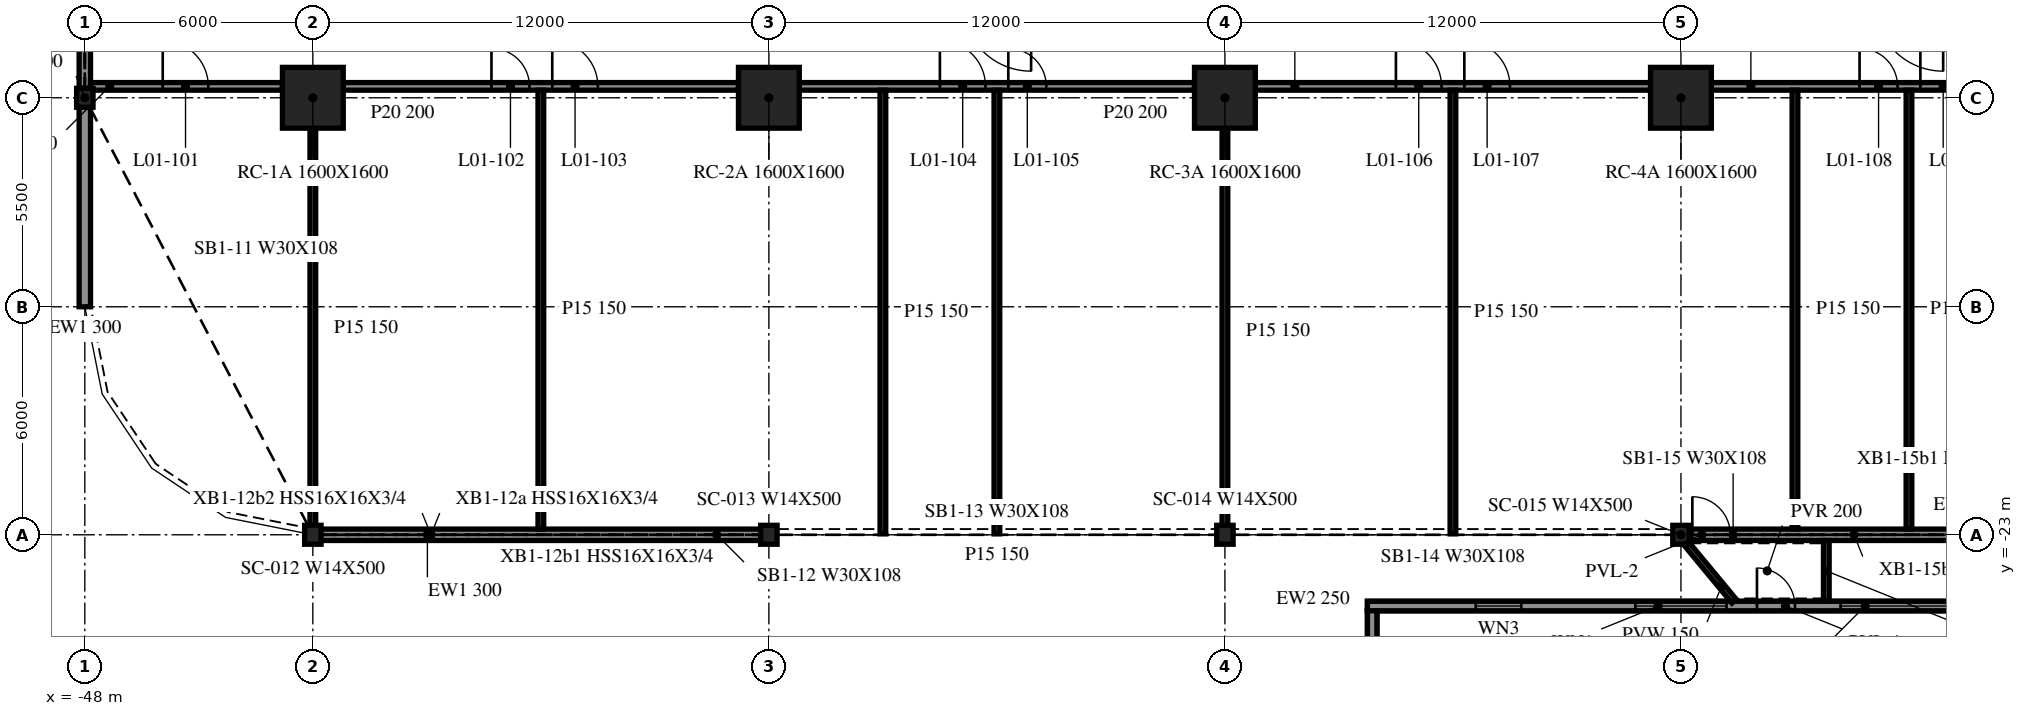
"""IFC4 building model, lengths in metres.
Left out: names, types, materials, properties, quantities, classifications, styles, units other than length and angle.
Written with IfcOpenShell. Run it as: python <this file> out.ifc"""

import sys

from ifc_helpers import new_model, si_unit, direction, frame, frame_2d, origin, origin_2d, place, context, subcontext, project, spatial, rectangle, i_section, extrude, element, fill, save


model = new_model("IFC4")
c1 = context("Model", 3, precision=1e-05, world=origin(), true_north=direction((0.0, 1.0)))
c2 = subcontext(c1, "Body", "Model", "MODEL_VIEW")
j1 = project(units=[si_unit("LENGTHUNIT", "METRE"), si_unit("PLANEANGLEUNIT", "RADIAN")], contexts=[c1])
p1 = place(None, origin())
s1 = spatial("IfcSite", under=j1, at=p1, CompositionType="ELEMENT")
p2 = place(p1, origin())
s2 = spatial("IfcBuilding", under=s1, at=p2, CompositionType="ELEMENT")
p3 = place(p2, frame((0.0, 0.0, 7.2)))
s3 = spatial("IfcBuildingStorey", under=s2, at=p3, CompositionType="ELEMENT", Elevation=7.2)
for number, where, z_axis, x_axis in (
    (1, (-42.0, -11.5, -0.34), (0.0, 0.0, 1.0), (1.0, 0.0, 0.0)),
    (2, (-30.0, -11.5, -0.34), (0.0, 0.0, 1.0), (1.0, 0.0, 0.0)),
    (3, (-18.0, -11.5, -0.34), (0.0, 0.0, 1.0), (1.0, 0.0, 0.0)),
    (4, (-6.0, -11.5, -0.34), (0.0, 0.0, 1.0), (1.0, 0.0, 0.0)),
):
    element("IfcColumn", number, at=place(p3, frame(where, z_axis=z_axis, x_axis=x_axis)), inside=s3, PredefinedType="COLUMN", context=c2, shape_type="SweptSolid", body=[
        extrude(rectangle(XDim=1.6, YDim=1.6, at=origin_2d()), origin(), (0.0, 0.0, 1.0), 4.3),
    ])
for number, where, z_axis, x_axis in (
    (5, (-48.0, -11.5, -0.34), (0.0, 0.0, 1.0), (1.0, 0.0, 0.0)),
    (6, (-42.0, -23.0, -0.34), (0.0, 0.0, 1.0), (1.0, 0.0, 0.0)),
    (7, (-30.0, -23.0, -0.34), (0.0, 0.0, 1.0), (1.0, 0.0, 0.0)),
    (8, (-18.0, -23.0, -0.34), (0.0, 0.0, 1.0), (1.0, 0.0, 0.0)),
    (9, (-6.0, -23.0, -0.34), (0.0, 0.0, 1.0), (1.0, 0.0, 0.0)),
):
    element("IfcColumn", number, at=place(p3, frame(where, z_axis=z_axis, x_axis=x_axis)), inside=s3, PredefinedType="COLUMN", context=c2, shape_type="SweptSolid", body=[
        extrude(i_section(OverallWidth=0.432, OverallDepth=0.498, WebThickness=0.056, FlangeThickness=0.089, at=origin_2d()), origin(), (0.0, 0.0, 1.0), 4.3),
    ])
p4 = place(p3, frame((-48.0, -0.249, 0.0), z_axis=(0.0, 0.0, 1.0), x_axis=(0.0, -1.0, 0.0)))
e10 = element("IfcWall", 10, at=p4, inside=s3, PredefinedType="NOTDEFINED", context=c2, shape_type="SweptSolid", body=[
    extrude(rectangle(XDim=11.002, YDim=0.3, at=frame_2d((5.501, 0.0))), origin(), (0.0, 0.0, 1.0), 3.203),
])
p5 = place(p3, frame((-48.0, -11.749, 0.0), z_axis=(0.0, 0.0, 1.0), x_axis=(0.0, -1.0, 0.0)))
e11 = element("IfcWall", 11, at=p5, inside=s3, PredefinedType="NOTDEFINED", context=c2, shape_type="SweptSolid", body=[
    extrude(rectangle(XDim=5.251, YDim=0.3, at=frame_2d((2.625, 0.0))), origin(), (0.0, 0.0, 1.0), 3.203),
])
p6 = place(p3, frame((-41.972, -23.0, 0.0), z_axis=(0.0, 0.0, 1.0), x_axis=(1.0, 0.0, 0.0)))
e12 = element("IfcWall", 12, at=p6, inside=s3, PredefinedType="NOTDEFINED", context=c2, shape_type="SweptSolid", body=[
    extrude(rectangle(XDim=11.944, YDim=0.3, at=frame_2d((5.972, 0.0))), origin(), (0.0, 0.0, 1.0), 3.203),
])
p7 = place(p3, frame((-5.972, -23.0, 0.0), z_axis=(0.0, 0.0, 1.0), x_axis=(1.0, 0.0, 0.0)))
e13 = element("IfcWall", 13, at=p7, inside=s3, PredefinedType="NOTDEFINED", context=c2, shape_type="SweptSolid", body=[
    extrude(rectangle(XDim=11.944, YDim=0.3, at=frame_2d((5.972, 0.0))), origin(), (0.0, 0.0, 1.0), 3.203),
])
p8 = place(p7, frame((0.272, 0.0, 0.0)))
e14 = element("IfcOpeningElement", 14, at=p8, cuts=e13, PredefinedType="OPENING", context=c2, shape_type="SweptSolid", body=[
    extrude(rectangle(XDim=1.0, YDim=2.1, at=frame_2d((0.5, 1.05))), frame((0.0, 0.16, 0.0), z_axis=(0.0, -1.0, 0.0), x_axis=(1.0, 0.0, 0.0)), (0.0, 0.0, 1.0), 0.32),
])
p9 = place(p3, frame((-14.25, -24.875, 0.0), z_axis=(0.0, 0.0, 1.0), x_axis=(1.0, 0.0, 0.0)))
e15 = element("IfcWall", 15, at=p9, inside=s3, PredefinedType="SOLIDWALL", context=c2, shape_type="SweptSolid", body=[
    extrude(rectangle(XDim=28.5, YDim=0.25, at=frame_2d((14.25, 0.0))), origin(), (0.0, 0.0, 1.0), 4.0),
])
p10 = place(p9, frame((2.85, 0.0, 0.9)))
e16 = element("IfcOpeningElement", 16, at=p10, cuts=e15, PredefinedType="OPENING", context=c2, shape_type="SweptSolid", body=[
    extrude(rectangle(XDim=1.2, YDim=2.0, at=frame_2d((0.6, 1.0))), frame((0.0, 0.135, 0.0), z_axis=(0.0, -1.0, 0.0), x_axis=(1.0, 0.0, 0.0)), (0.0, 0.0, 1.0), 0.27),
])
p11 = place(p9, frame((7.05, 0.0, 0.9)))
e17 = element("IfcOpeningElement", 17, at=p11, cuts=e15, PredefinedType="OPENING", context=c2, shape_type="SweptSolid", body=[
    extrude(rectangle(XDim=2.4, YDim=2.0, at=frame_2d((1.2, 1.0))), frame((0.0, 0.135, 0.0), z_axis=(0.0, -1.0, 0.0), x_axis=(1.0, 0.0, 0.0)), (0.0, 0.0, 1.0), 0.27),
])
p12 = place(p9, frame((12.45, 0.0, 0.9)))
e18 = element("IfcOpeningElement", 18, at=p12, cuts=e15, PredefinedType="OPENING", context=c2, shape_type="SweptSolid", body=[
    extrude(rectangle(XDim=3.6, YDim=2.0, at=frame_2d((1.8, 1.0))), frame((0.0, 0.135, 0.0), z_axis=(0.0, -1.0, 0.0), x_axis=(1.0, 0.0, 0.0)), (0.0, 0.0, 1.0), 0.27),
])
p13 = place(p9, frame((19.05, 0.0, 0.9)))
e19 = element("IfcOpeningElement", 19, at=p13, cuts=e15, PredefinedType="OPENING", context=c2, shape_type="SweptSolid", body=[
    extrude(rectangle(XDim=2.4, YDim=2.0, at=frame_2d((1.2, 1.0))), frame((0.0, 0.135, 0.0), z_axis=(0.0, -1.0, 0.0), x_axis=(1.0, 0.0, 0.0)), (0.0, 0.0, 1.0), 0.27),
])
p14 = place(p9, frame((24.45, 0.0, 0.9)))
e20 = element("IfcOpeningElement", 20, at=p14, cuts=e15, PredefinedType="OPENING", context=c2, shape_type="SweptSolid", body=[
    extrude(rectangle(XDim=1.2, YDim=2.0, at=frame_2d((0.6, 1.0))), frame((0.0, 0.135, 0.0), z_axis=(0.0, -1.0, 0.0), x_axis=(1.0, 0.0, 0.0)), (0.0, 0.0, 1.0), 0.27),
])
p15 = place(p9, frame((10.25, 0.0, 0.0)))
e21 = element("IfcOpeningElement", 21, at=p15, cuts=e15, PredefinedType="OPENING", context=c2, shape_type="SweptSolid", body=[
    extrude(rectangle(XDim=1.0, YDim=2.1, at=frame_2d((0.5, 1.05))), frame((0.0, 0.135, 0.0), z_axis=(0.0, -1.0, 0.0), x_axis=(1.0, 0.0, 0.0)), (0.0, 0.0, 1.0), 0.27),
])
p16 = place(p3, frame((-14.125, -33.25, 0.0), z_axis=(0.0, 0.0, 1.0), x_axis=(0.0, 1.0, 0.0)))
e22 = element("IfcWall", 22, at=p16, inside=s3, PredefinedType="SOLIDWALL", context=c2, shape_type="SweptSolid", body=[
    extrude(rectangle(XDim=8.25, YDim=0.25, at=frame_2d((4.125, 0.0))), origin(), (0.0, 0.0, 1.0), 4.0),
])
p17 = place(p16, frame((2.925, 0.0, 0.0)))
e23 = element("IfcOpeningElement", 23, at=p17, cuts=e22, PredefinedType="OPENING", context=c2, shape_type="SweptSolid", body=[
    extrude(rectangle(XDim=2.4, YDim=2.7, at=frame_2d((1.2, 1.35))), frame((0.0, 0.135, 0.0), z_axis=(0.0, -1.0, 0.0), x_axis=(1.0, 0.0, 0.0)), (0.0, 0.0, 1.0), 0.27),
])
p18 = place(p3, frame((-14.25, -24.875, 4.3), z_axis=(0.0, 0.0, 1.0), x_axis=(1.0, 0.0, 0.0)))
e24 = element("IfcWall", 24, at=p18, inside=s3, PredefinedType="PARAPET", context=c2, shape_type="SweptSolid", body=[
    extrude(rectangle(XDim=28.5, YDim=0.25, at=frame_2d((14.25, 0.0))), origin(), (0.0, 0.0, 1.0), 0.6),
])
p19 = place(p3, frame((-14.125, -33.0, 4.3), z_axis=(0.0, 0.0, 1.0), x_axis=(0.0, 1.0, 0.0)))
e25 = element("IfcWall", 25, at=p19, inside=s3, PredefinedType="PARAPET", context=c2, shape_type="SweptSolid", body=[
    extrude(rectangle(XDim=8.0, YDim=0.25, at=frame_2d((4.0, 0.0))), origin(), (0.0, 0.0, 1.0), 0.6),
])
p20 = place(p3, frame((-4.6, -24.75, 0.0), z_axis=(0.0, 0.0, 1.0), x_axis=(-0.637776936143, 0.770221123914, 0.0)))
e26 = element("IfcWall", 26, at=p20, inside=s3, PredefinedType="SOLIDWALL", context=c2, shape_type="SweptSolid", body=[
    extrude(rectangle(XDim=2.077, YDim=0.15, at=frame_2d((1.039, 0.0))), origin(), (0.0, 0.0, 1.0), 3.8),
])
p21 = place(p3, frame((-2.175, -24.75, 0.0), z_axis=(0.0, 0.0, 1.0), x_axis=(0.0, 1.0, 0.0)))
e27 = element("IfcWall", 27, at=p21, inside=s3, PredefinedType="SOLIDWALL", context=c2, shape_type="SweptSolid", body=[
    extrude(rectangle(XDim=1.6, YDim=0.15, at=frame_2d((0.8, 0.0))), origin(), (0.0, 0.0, 1.0), 3.8),
])
p22 = place(p3, frame((-47.85, -11.2, 0.0), z_axis=(0.0, 0.0, 1.0), x_axis=(1.0, 0.0, 0.0)))
e28 = element("IfcWall", 28, at=p22, inside=s3, PredefinedType="PARTITIONING", context=c2, shape_type="SweptSolid", body=[
    extrude(rectangle(XDim=5.05, YDim=0.2, at=frame_2d((2.525, 0.0))), origin(), (0.0, 0.0, 1.0), 3.96),
])
p23 = place(p22, frame((1.9, 0.0, 0.0)))
e29 = element("IfcOpeningElement", 29, at=p23, cuts=e28, PredefinedType="OPENING", context=c2, shape_type="SweptSolid", body=[
    extrude(rectangle(XDim=1.2, YDim=2.1, at=frame_2d((0.6, 1.05))), frame((0.0, 0.11, 0.0), z_axis=(0.0, -1.0, 0.0), x_axis=(1.0, 0.0, 0.0)), (0.0, 0.0, 1.0), 0.22),
])
p24 = place(p3, frame((-41.2, -11.2, 0.0), z_axis=(0.0, 0.0, 1.0), x_axis=(1.0, 0.0, 0.0)))
e30 = element("IfcWall", 30, at=p24, inside=s3, PredefinedType="PARTITIONING", context=c2, shape_type="SweptSolid", body=[
    extrude(rectangle(XDim=10.4, YDim=0.2, at=frame_2d((5.2, 0.0))), origin(), (0.0, 0.0, 1.0), 3.96),
])
p25 = place(p24, frame((3.9, 0.0, 0.0)))
e31 = element("IfcOpeningElement", 31, at=p25, cuts=e30, PredefinedType="OPENING", context=c2, shape_type="SweptSolid", body=[
    extrude(rectangle(XDim=1.0, YDim=2.1, at=frame_2d((0.5, 1.05))), frame((0.0, 0.11, 0.0), z_axis=(0.0, -1.0, 0.0), x_axis=(1.0, 0.0, 0.0)), (0.0, 0.0, 1.0), 0.22),
])
p26 = place(p24, frame((5.5, 0.0, 0.0)))
e32 = element("IfcOpeningElement", 32, at=p26, cuts=e30, PredefinedType="OPENING", context=c2, shape_type="SweptSolid", body=[
    extrude(rectangle(XDim=1.2, YDim=2.1, at=frame_2d((0.6, 1.05))), frame((0.0, 0.11, 0.0), z_axis=(0.0, -1.0, 0.0), x_axis=(1.0, 0.0, 0.0)), (0.0, 0.0, 1.0), 0.22),
])
p27 = place(p3, frame((-29.2, -11.2, 0.0), z_axis=(0.0, 0.0, 1.0), x_axis=(1.0, 0.0, 0.0)))
e33 = element("IfcWall", 33, at=p27, inside=s3, PredefinedType="PARTITIONING", context=c2, shape_type="SweptSolid", body=[
    extrude(rectangle(XDim=10.4, YDim=0.2, at=frame_2d((5.2, 0.0))), origin(), (0.0, 0.0, 1.0), 3.96),
])
p28 = place(p27, frame((3.7, 0.0, 0.0)))
e34 = element("IfcOpeningElement", 34, at=p28, cuts=e33, PredefinedType="OPENING", context=c2, shape_type="SweptSolid", body=[
    extrude(rectangle(XDim=1.2, YDim=2.1, at=frame_2d((0.6, 1.05))), frame((0.0, 0.11, 0.0), z_axis=(0.0, -1.0, 0.0), x_axis=(1.0, 0.0, 0.0)), (0.0, 0.0, 1.0), 0.22),
])
p29 = place(p27, frame((5.5, 0.0, 0.0)))
e35 = element("IfcOpeningElement", 35, at=p29, cuts=e33, PredefinedType="OPENING", context=c2, shape_type="SweptSolid", body=[
    extrude(rectangle(XDim=1.0, YDim=2.1, at=frame_2d((0.5, 1.05))), frame((0.0, 0.11, 0.0), z_axis=(0.0, -1.0, 0.0), x_axis=(1.0, 0.0, 0.0)), (0.0, 0.0, 1.0), 0.22),
])
p30 = place(p3, frame((-17.2, -11.2, 0.0), z_axis=(0.0, 0.0, 1.0), x_axis=(1.0, 0.0, 0.0)))
e36 = element("IfcWall", 36, at=p30, inside=s3, PredefinedType="PARTITIONING", context=c2, shape_type="SweptSolid", body=[
    extrude(rectangle(XDim=10.4, YDim=0.2, at=frame_2d((5.2, 0.0))), origin(), (0.0, 0.0, 1.0), 3.96),
])
p31 = place(p30, frame((3.7, 0.0, 0.0)))
e37 = element("IfcOpeningElement", 37, at=p31, cuts=e36, PredefinedType="OPENING", context=c2, shape_type="SweptSolid", body=[
    extrude(rectangle(XDim=1.2, YDim=2.1, at=frame_2d((0.6, 1.05))), frame((0.0, 0.11, 0.0), z_axis=(0.0, -1.0, 0.0), x_axis=(1.0, 0.0, 0.0)), (0.0, 0.0, 1.0), 0.22),
])
p32 = place(p30, frame((5.5, 0.0, 0.0)))
e38 = element("IfcOpeningElement", 38, at=p32, cuts=e36, PredefinedType="OPENING", context=c2, shape_type="SweptSolid", body=[
    extrude(rectangle(XDim=1.2, YDim=2.1, at=frame_2d((0.6, 1.05))), frame((0.0, 0.11, 0.0), z_axis=(0.0, -1.0, 0.0), x_axis=(1.0, 0.0, 0.0)), (0.0, 0.0, 1.0), 0.22),
])
p33 = place(p3, frame((-5.2, -11.2, 0.0), z_axis=(0.0, 0.0, 1.0), x_axis=(1.0, 0.0, 0.0)))
e39 = element("IfcWall", 39, at=p33, inside=s3, PredefinedType="PARTITIONING", context=c2, shape_type="SweptSolid", body=[
    extrude(rectangle(XDim=10.4, YDim=0.2, at=frame_2d((5.2, 0.0))), origin(), (0.0, 0.0, 1.0), 3.96),
])
p34 = place(p33, frame((3.9, 0.0, 0.0)))
e40 = element("IfcOpeningElement", 40, at=p34, cuts=e39, PredefinedType="OPENING", context=c2, shape_type="SweptSolid", body=[
    extrude(rectangle(XDim=1.0, YDim=2.1, at=frame_2d((0.5, 1.05))), frame((0.0, 0.11, 0.0), z_axis=(0.0, -1.0, 0.0), x_axis=(1.0, 0.0, 0.0)), (0.0, 0.0, 1.0), 0.22),
])
p35 = place(p33, frame((5.5, 0.0, 0.0)))
e41 = element("IfcOpeningElement", 41, at=p35, cuts=e39, PredefinedType="OPENING", context=c2, shape_type="SweptSolid", body=[
    extrude(rectangle(XDim=1.2, YDim=2.1, at=frame_2d((0.6, 1.05))), frame((0.0, 0.11, 0.0), z_axis=(0.0, -1.0, 0.0), x_axis=(1.0, 0.0, 0.0)), (0.0, 0.0, 1.0), 0.22),
])
p36 = place(p3, frame((-42.0, -22.847, 0.0), z_axis=(0.0, 0.0, 1.0), x_axis=(0.0, 1.0, 0.0)))
e42 = element("IfcWall", 42, at=p36, inside=s3, PredefinedType="PARTITIONING", context=c2, shape_type="SweptSolid", body=[
    extrude(rectangle(XDim=10.547, YDim=0.15, at=frame_2d((5.273, 0.0))), origin(), (0.0, 0.0, 1.0), 3.96),
])
p37 = place(p3, frame((-36.0, -22.85, 0.0), z_axis=(0.0, 0.0, 1.0), x_axis=(0.0, 1.0, 0.0)))
e43 = element("IfcWall", 43, at=p37, inside=s3, PredefinedType="PARTITIONING", context=c2, shape_type="SweptSolid", body=[
    extrude(rectangle(XDim=11.55, YDim=0.15, at=frame_2d((5.775, 0.0))), origin(), (0.0, 0.0, 1.0), 3.96),
])
for number, where, z_axis, x_axis in (
    (44, (-27.0, -22.975, 0.0), (0.0, 0.0, 1.0), (0.0, 1.0, 0.0)),
    (45, (-24.0, -22.975, 0.0), (0.0, 0.0, 1.0), (0.0, 1.0, 0.0)),
):
    element("IfcWall", number, at=place(p3, frame(where, z_axis=z_axis, x_axis=x_axis)), inside=s3, PredefinedType="PARTITIONING", context=c2, shape_type="SweptSolid", body=[
        extrude(rectangle(XDim=11.675, YDim=0.15, at=frame_2d((5.837, 0.0))), origin(), (0.0, 0.0, 1.0), 3.96),
    ])
p38 = place(p3, frame((-18.0, -22.975, 0.0), z_axis=(0.0, 0.0, 1.0), x_axis=(0.0, 1.0, 0.0)))
e46 = element("IfcWall", 46, at=p38, inside=s3, PredefinedType="PARTITIONING", context=c2, shape_type="SweptSolid", body=[
    extrude(rectangle(XDim=10.675, YDim=0.15, at=frame_2d((5.337, 0.0))), origin(), (0.0, 0.0, 1.0), 3.96),
])
p39 = place(p3, frame((-12.0, -22.975, 0.0), z_axis=(0.0, 0.0, 1.0), x_axis=(0.0, 1.0, 0.0)))
e47 = element("IfcWall", 47, at=p39, inside=s3, PredefinedType="PARTITIONING", context=c2, shape_type="SweptSolid", body=[
    extrude(rectangle(XDim=11.675, YDim=0.15, at=frame_2d((5.837, 0.0))), origin(), (0.0, 0.0, 1.0), 3.96),
])
for number, where, z_axis, x_axis in (
    (48, (-3.0, -22.85, 0.0), (0.0, 0.0, 1.0), (0.0, 1.0, 0.0)),
    (49, (0.0, -22.85, 0.0), (0.0, 0.0, 1.0), (0.0, 1.0, 0.0)),
):
    element("IfcWall", number, at=place(p3, frame(where, z_axis=z_axis, x_axis=x_axis)), inside=s3, PredefinedType="PARTITIONING", context=c2, shape_type="SweptSolid", body=[
        extrude(rectangle(XDim=11.55, YDim=0.15, at=frame_2d((5.775, 0.0))), origin(), (0.0, 0.0, 1.0), 3.96),
    ])
p40 = place(p10, origin())
e50 = element("IfcWindow", 50, at=p40, inside=s3, PartitioningType="SINGLE_PANEL", PredefinedType="WINDOW", context=c2, shape_type="SweptSolid", body=[
    extrude(rectangle(XDim=1.2, YDim=2.0, at=frame_2d((0.6, 1.0))), frame((0.0, 0.03, 0.0), z_axis=(0.0, -1.0, 0.0), x_axis=(1.0, 0.0, 0.0)), (0.0, 0.0, 1.0), 0.06),
])
fill(e16, e50)
p41 = place(p11, origin())
e51 = element("IfcWindow", 51, at=p41, inside=s3, PartitioningType="SINGLE_PANEL", PredefinedType="WINDOW", context=c2, shape_type="SweptSolid", body=[
    extrude(rectangle(XDim=2.4, YDim=2.0, at=frame_2d((1.2, 1.0))), frame((0.0, 0.03, 0.0), z_axis=(0.0, -1.0, 0.0), x_axis=(1.0, 0.0, 0.0)), (0.0, 0.0, 1.0), 0.06),
])
fill(e17, e51)
p42 = place(p12, origin())
e52 = element("IfcWindow", 52, at=p42, inside=s3, PartitioningType="SINGLE_PANEL", PredefinedType="WINDOW", context=c2, shape_type="SweptSolid", body=[
    extrude(rectangle(XDim=3.6, YDim=2.0, at=frame_2d((1.8, 1.0))), frame((0.0, 0.03, 0.0), z_axis=(0.0, -1.0, 0.0), x_axis=(1.0, 0.0, 0.0)), (0.0, 0.0, 1.0), 0.06),
])
fill(e18, e52)
p43 = place(p15, origin())
e53 = element("IfcDoor", 53, at=p43, inside=s3, OperationType="SINGLE_SWING_LEFT", PredefinedType="DOOR", context=c2, shape_type="SweptSolid", body=[
    extrude(rectangle(XDim=1.0, YDim=2.1, at=frame_2d((0.5, 1.05))), frame((0.0, 0.025, 0.0), z_axis=(0.0, -1.0, 0.0), x_axis=(1.0, 0.0, 0.0)), (0.0, 0.0, 1.0), 0.05),
])
fill(e21, e53)
p44 = place(p8, origin())
e54 = element("IfcDoor", 54, at=p44, inside=s3, OperationType="SINGLE_SWING_RIGHT", PredefinedType="DOOR", context=c2, shape_type="SweptSolid", body=[
    extrude(rectangle(XDim=1.0, YDim=2.1, at=frame_2d((0.5, 1.05))), frame((0.0, 0.025, 0.0), z_axis=(0.0, -1.0, 0.0), x_axis=(1.0, 0.0, 0.0)), (0.0, 0.0, 1.0), 0.05),
])
fill(e14, e54)
p45 = place(p23, origin())
e55 = element("IfcDoor", 55, at=p45, inside=s3, OperationType="SINGLE_SWING_RIGHT", PredefinedType="DOOR", context=c2, shape_type="SweptSolid", body=[
    extrude(rectangle(XDim=1.2, YDim=2.1, at=frame_2d((0.6, 1.05))), frame((0.0, 0.025, 0.0), z_axis=(0.0, -1.0, 0.0), x_axis=(1.0, 0.0, 0.0)), (0.0, 0.0, 1.0), 0.05),
])
fill(e29, e55)
p46 = place(p25, origin())
e56 = element("IfcDoor", 56, at=p46, inside=s3, OperationType="SINGLE_SWING_RIGHT", PredefinedType="DOOR", context=c2, shape_type="SweptSolid", body=[
    extrude(rectangle(XDim=1.0, YDim=2.1, at=frame_2d((0.5, 1.05))), frame((0.0, 0.025, 0.0), z_axis=(0.0, -1.0, 0.0), x_axis=(1.0, 0.0, 0.0)), (0.0, 0.0, 1.0), 0.05),
])
fill(e31, e56)
p47 = place(p26, origin())
e57 = element("IfcDoor", 57, at=p47, inside=s3, OperationType="SINGLE_SWING_LEFT", PredefinedType="DOOR", context=c2, shape_type="SweptSolid", body=[
    extrude(rectangle(XDim=1.2, YDim=2.1, at=frame_2d((0.6, 1.05))), frame((0.0, 0.025, 0.0), z_axis=(0.0, -1.0, 0.0), x_axis=(1.0, 0.0, 0.0)), (0.0, 0.0, 1.0), 0.05),
])
fill(e32, e57)
p48 = place(p28, origin())
e58 = element("IfcDoor", 58, at=p48, inside=s3, OperationType="SINGLE_SWING_RIGHT", PredefinedType="DOOR", context=c2, shape_type="SweptSolid", body=[
    extrude(rectangle(XDim=1.2, YDim=2.1, at=frame_2d((0.6, 1.05))), frame((0.0, 0.025, 0.0), z_axis=(0.0, -1.0, 0.0), x_axis=(1.0, 0.0, 0.0)), (0.0, 0.0, 1.0), 0.05),
])
fill(e34, e58)
p49 = place(p29, origin())
e59 = element("IfcDoor", 59, at=p49, inside=s3, OperationType="SINGLE_SWING_LEFT", PredefinedType="DOOR", context=c2, shape_type="SweptSolid", body=[
    extrude(rectangle(XDim=1.0, YDim=2.1, at=frame_2d((0.5, 1.05))), frame((0.0, 0.025, 0.0), z_axis=(0.0, -1.0, 0.0), x_axis=(1.0, 0.0, 0.0)), (0.0, 0.0, 1.0), 0.05),
])
fill(e35, e59)
p50 = place(p31, origin())
e60 = element("IfcDoor", 60, at=p50, inside=s3, OperationType="SINGLE_SWING_RIGHT", PredefinedType="DOOR", context=c2, shape_type="SweptSolid", body=[
    extrude(rectangle(XDim=1.2, YDim=2.1, at=frame_2d((0.6, 1.05))), frame((0.0, 0.025, 0.0), z_axis=(0.0, -1.0, 0.0), x_axis=(1.0, 0.0, 0.0)), (0.0, 0.0, 1.0), 0.05),
])
fill(e37, e60)
p51 = place(p32, origin())
e61 = element("IfcDoor", 61, at=p51, inside=s3, OperationType="SINGLE_SWING_LEFT", PredefinedType="DOOR", context=c2, shape_type="SweptSolid", body=[
    extrude(rectangle(XDim=1.2, YDim=2.1, at=frame_2d((0.6, 1.05))), frame((0.0, 0.025, 0.0), z_axis=(0.0, -1.0, 0.0), x_axis=(1.0, 0.0, 0.0)), (0.0, 0.0, 1.0), 0.05),
])
fill(e38, e61)
p52 = place(p34, origin())
e62 = element("IfcDoor", 62, at=p52, inside=s3, OperationType="SINGLE_SWING_RIGHT", PredefinedType="DOOR", context=c2, shape_type="SweptSolid", body=[
    extrude(rectangle(XDim=1.0, YDim=2.1, at=frame_2d((0.5, 1.05))), frame((0.0, 0.025, 0.0), z_axis=(0.0, -1.0, 0.0), x_axis=(1.0, 0.0, 0.0)), (0.0, 0.0, 1.0), 0.05),
])
fill(e40, e62)
p53 = place(p35, origin())
e63 = element("IfcDoor", 63, at=p53, inside=s3, OperationType="SINGLE_SWING_LEFT", PredefinedType="DOOR", context=c2, shape_type="SweptSolid", body=[
    extrude(rectangle(XDim=1.2, YDim=2.1, at=frame_2d((0.6, 1.05))), frame((0.0, 0.025, 0.0), z_axis=(0.0, -1.0, 0.0), x_axis=(1.0, 0.0, 0.0)), (0.0, 0.0, 1.0), 0.05),
])
fill(e41, e63)
save(model, sys.argv[1])
